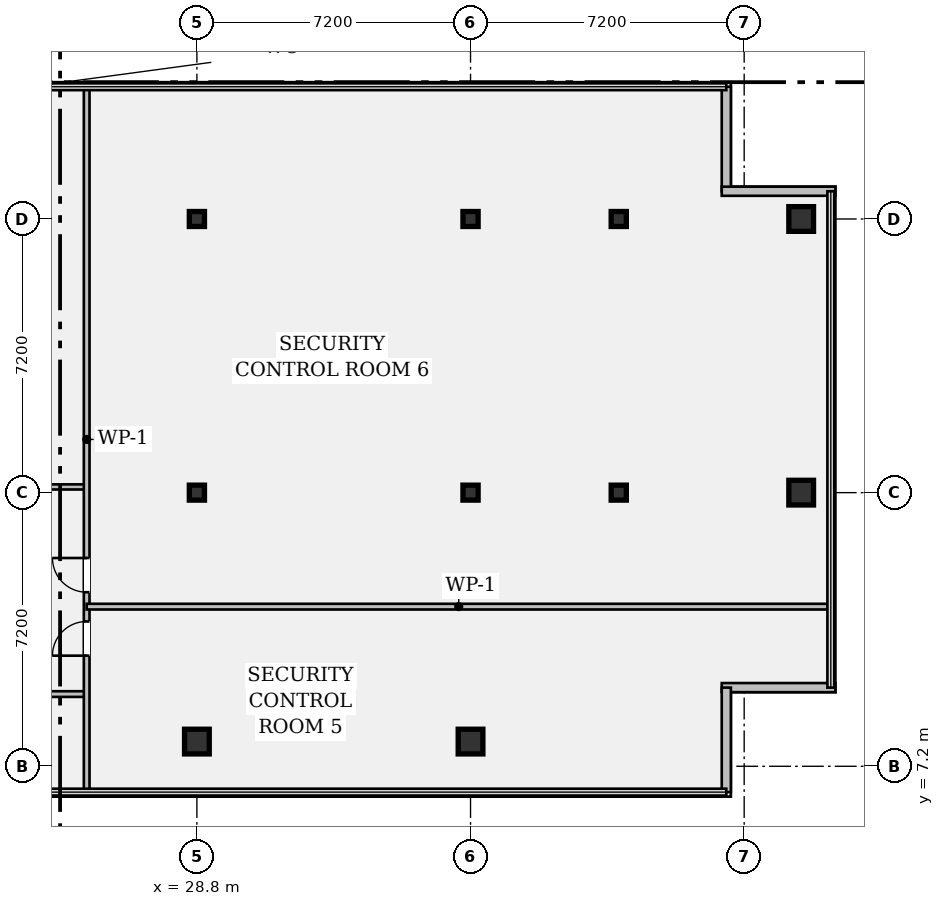
"""IFC4 building model, lengths in metres.
Left out: names, types, materials, properties, quantities, classifications, styles, units other than length and angle.
Written with IfcOpenShell. Run it as: python <this file> out.ifc"""

import sys

from ifc_helpers import new_model, si_unit, direction, frame, frame_2d, origin, origin_2d, place, context, subcontext, project, spatial, rectangle, hollow_rectangle, i_section, extrude, element, fill, save


model = new_model("IFC4")
c1 = context("Model", 3, precision=1e-05, world=origin(), true_north=direction((0.0, 1.0)))
c2 = subcontext(c1, "Body", "Model", "MODEL_VIEW")
j1 = project(units=[si_unit("LENGTHUNIT", "METRE"), si_unit("PLANEANGLEUNIT", "RADIAN")], contexts=[c1])
p1 = place(None, origin())
s1 = spatial("IfcSite", under=j1, at=p1, CompositionType="ELEMENT")
p2 = place(p1, origin())
s2 = spatial("IfcBuilding", under=s1, at=p2, CompositionType="ELEMENT")
p3 = place(p2, frame((0.0, 0.0, 248.15)))
s3 = spatial("IfcBuildingStorey", under=s2, at=p3, CompositionType="ELEMENT", Elevation=248.15)
p4 = place(p3, frame((28.8, 7.85, 0.0), z_axis=(0.0, 0.0, 1.0), x_axis=(1.0, 0.0, 0.0)))
e1 = element("IfcColumn", 1, at=p4, inside=s3, PredefinedType="COLUMN", context=c2, shape_type="SweptSolid", body=[
    extrude(hollow_rectangle(XDim=0.65, YDim=0.65, WallThickness=0.04, at=origin_2d()), origin(), (0.0, 0.0, 1.0), 3.24),
])
for number, where, z_axis, x_axis in (
    (2, (28.8, 14.4, 0.0), (0.0, 0.0, 1.0), (1.0, 0.0, 0.0)),
    (3, (28.8, 21.6, 0.0), (0.0, 0.0, 1.0), (1.0, 0.0, 0.0)),
):
    element("IfcColumn", number, at=place(p3, frame(where, z_axis=z_axis, x_axis=x_axis)), inside=s3, PredefinedType="COLUMN", context=c2, shape_type="SweptSolid", body=[
        extrude(i_section(OverallWidth=0.399, OverallDepth=0.394, WebThickness=0.023, FlangeThickness=0.037, FilletRadius=0.018, at=origin_2d()), origin(), (0.0, 0.0, 1.0), 3.24),
    ])
p5 = place(p3, frame((36.0, 7.85, 0.0), z_axis=(0.0, 0.0, 1.0), x_axis=(1.0, 0.0, 0.0)))
e4 = element("IfcColumn", 4, at=p5, inside=s3, PredefinedType="COLUMN", context=c2, shape_type="SweptSolid", body=[
    extrude(hollow_rectangle(XDim=0.65, YDim=0.65, WallThickness=0.04, at=origin_2d()), origin(), (0.0, 0.0, 1.0), 3.24),
])
for number, where, z_axis, x_axis in (
    (5, (36.0, 14.4, 0.0), (0.0, 0.0, 1.0), (1.0, 0.0, 0.0)),
    (6, (36.0, 21.6, 0.0), (0.0, 0.0, 1.0), (1.0, 0.0, 0.0)),
    (7, (39.9, 14.4, 0.0), (0.0, 0.0, 1.0), (1.0, 0.0, 0.0)),
    (8, (39.9, 21.6, 0.0), (0.0, 0.0, 1.0), (1.0, 0.0, 0.0)),
):
    element("IfcColumn", number, at=place(p3, frame(where, z_axis=z_axis, x_axis=x_axis)), inside=s3, PredefinedType="COLUMN", context=c2, shape_type="SweptSolid", body=[
        extrude(i_section(OverallWidth=0.399, OverallDepth=0.394, WebThickness=0.023, FlangeThickness=0.037, FilletRadius=0.018, at=origin_2d()), origin(), (0.0, 0.0, 1.0), 3.24),
    ])
for number, where, z_axis, x_axis in (
    (9, (44.7, 14.4, 0.0), (0.0, 0.0, 1.0), (1.0, 0.0, 0.0)),
    (10, (44.7, 21.6, 0.0), (0.0, 0.0, 1.0), (1.0, 0.0, 0.0)),
):
    element("IfcColumn", number, at=place(p3, frame(where, z_axis=z_axis, x_axis=x_axis)), inside=s3, PredefinedType="COLUMN", context=c2, shape_type="SweptSolid", body=[
        extrude(hollow_rectangle(XDim=0.65, YDim=0.65, WallThickness=0.04, at=origin_2d()), origin(), (0.0, 0.0, 1.0), 3.24),
    ])
p6 = place(p3, frame((42.73, 25.08, 0.0), z_axis=(0.0, 0.0, 1.0), x_axis=(0.0, -1.0, 0.0)))
e11 = element("IfcWall", 11, at=p6, inside=s3, PredefinedType="STANDARD", context=c2, shape_type="SweptSolid", body=[
    extrude(rectangle(XDim=2.75, YDim=0.24, at=frame_2d((1.375, 0.0))), origin(), (0.0, 0.0, 1.0), 3.24),
])
for number, where, z_axis, x_axis in (
    (12, (42.61, 22.33, 0.0), (0.0, 0.0, 1.0), (1.0, 0.0, 0.0)),
    (13, (45.6, 9.27, 0.0), (0.0, 0.0, 1.0), (-1.0, 0.0, 0.0)),
):
    element("IfcWall", number, at=place(p3, frame(where, z_axis=z_axis, x_axis=x_axis)), inside=s3, PredefinedType="STANDARD", context=c2, shape_type="SweptSolid", body=[
        extrude(rectangle(XDim=2.99, YDim=0.24, at=frame_2d((1.495, 0.0))), origin(), (0.0, 0.0, 1.0), 3.24),
    ])
p7 = place(p3, frame((42.73, 9.27, 0.0), z_axis=(0.0, 0.0, 1.0), x_axis=(0.0, -1.0, 0.0)))
e14 = element("IfcWall", 14, at=p7, inside=s3, PredefinedType="STANDARD", context=c2, shape_type="SweptSolid", body=[
    extrude(rectangle(XDim=2.75, YDim=0.24, at=frame_2d((1.375, 0.0))), origin(), (0.0, 0.0, 1.0), 3.24),
])
p8 = place(p3, frame((23.95, 9.1, 0.0), z_axis=(0.0, 0.0, 1.0), x_axis=(1.0, 0.0, 0.0)))
e15 = element("IfcWall", 15, at=p8, inside=s3, PredefinedType="PARTITIONING", context=c2, shape_type="SweptSolid", body=[
    extrude(rectangle(XDim=1.95, YDim=0.15, at=frame_2d((0.975, 0.0))), origin(), (0.0, 0.0, 1.0), 2.808),
])
p9 = place(p3, frame((23.95, 14.55, 0.0), z_axis=(0.0, 0.0, 1.0), x_axis=(1.0, 0.0, 0.0)))
e16 = element("IfcWall", 16, at=p9, inside=s3, PredefinedType="PARTITIONING", context=c2, shape_type="SweptSolid", body=[
    extrude(rectangle(XDim=1.95, YDim=0.135, at=frame_2d((0.975, 0.0))), origin(), (0.0, 0.0, 1.0), 2.676),
])
p10 = place(p3, frame((25.9, 6.52, 0.0), z_axis=(0.0, 0.0, 1.0), x_axis=(0.0, 1.0, 0.0)))
e17 = element("IfcWall", 17, at=p10, inside=s3, PredefinedType="PARTITIONING", context=c2, shape_type="SweptSolid", body=[
    extrude(rectangle(XDim=18.56, YDim=0.15, at=frame_2d((9.28, 0.0))), origin(), (0.0, 0.0, 1.0), 2.676),
])
p11 = place(p10, frame((3.59, 0.0, 0.0)))
e18 = element("IfcOpeningElement", 18, at=p11, cuts=e17, PredefinedType="OPENING", context=c2, shape_type="SweptSolid", body=[
    extrude(rectangle(XDim=0.9, YDim=2.15, at=frame_2d((0.45, 1.075))), frame((0.0, 0.087, 0.0), z_axis=(0.0, -1.0, 0.0), x_axis=(1.0, 0.0, 0.0)), (0.0, 0.0, 1.0), 0.174),
])
p12 = place(p10, frame((5.26, 0.0, 0.0)))
e19 = element("IfcOpeningElement", 19, at=p12, cuts=e17, PredefinedType="OPENING", context=c2, shape_type="SweptSolid", body=[
    extrude(rectangle(XDim=0.9, YDim=2.15, at=frame_2d((0.45, 1.075))), frame((0.0, 0.087, 0.0), z_axis=(0.0, -1.0, 0.0), x_axis=(1.0, 0.0, 0.0)), (0.0, 0.0, 1.0), 0.174),
])
p13 = place(p3, frame((25.9, 11.4, 0.0), z_axis=(0.0, 0.0, 1.0), x_axis=(1.0, 0.0, 0.0)))
e20 = element("IfcWall", 20, at=p13, inside=s3, PredefinedType="PARTITIONING", context=c2, shape_type="SweptSolid", body=[
    extrude(rectangle(XDim=19.58, YDim=0.15, at=frame_2d((9.79, 0.0))), origin(), (0.0, 0.0, 1.0), 2.676),
])
p14 = place(p11, origin())
e21 = element("IfcDoor", 21, at=p14, inside=s3, OperationType="SINGLE_SWING_LEFT", PredefinedType="DOOR", context=c2, shape_type="SweptSolid", body=[
    extrude(rectangle(XDim=0.9, YDim=2.15, at=frame_2d((0.45, 1.075))), frame((0.0, 0.025, 0.0), z_axis=(0.0, -1.0, 0.0), x_axis=(1.0, 0.0, 0.0)), (0.0, 0.0, 1.0), 0.05),
])
fill(e18, e21)
p15 = place(p12, origin())
e22 = element("IfcDoor", 22, at=p15, inside=s3, OperationType="SINGLE_SWING_RIGHT", PredefinedType="DOOR", context=c2, shape_type="SweptSolid", body=[
    extrude(rectangle(XDim=0.9, YDim=2.15, at=frame_2d((0.45, 1.075))), frame((0.0, 0.025, 0.0), z_axis=(0.0, -1.0, 0.0), x_axis=(1.0, 0.0, 0.0)), (0.0, 0.0, 1.0), 0.05),
])
fill(e19, e22)
save(model, sys.argv[1])
